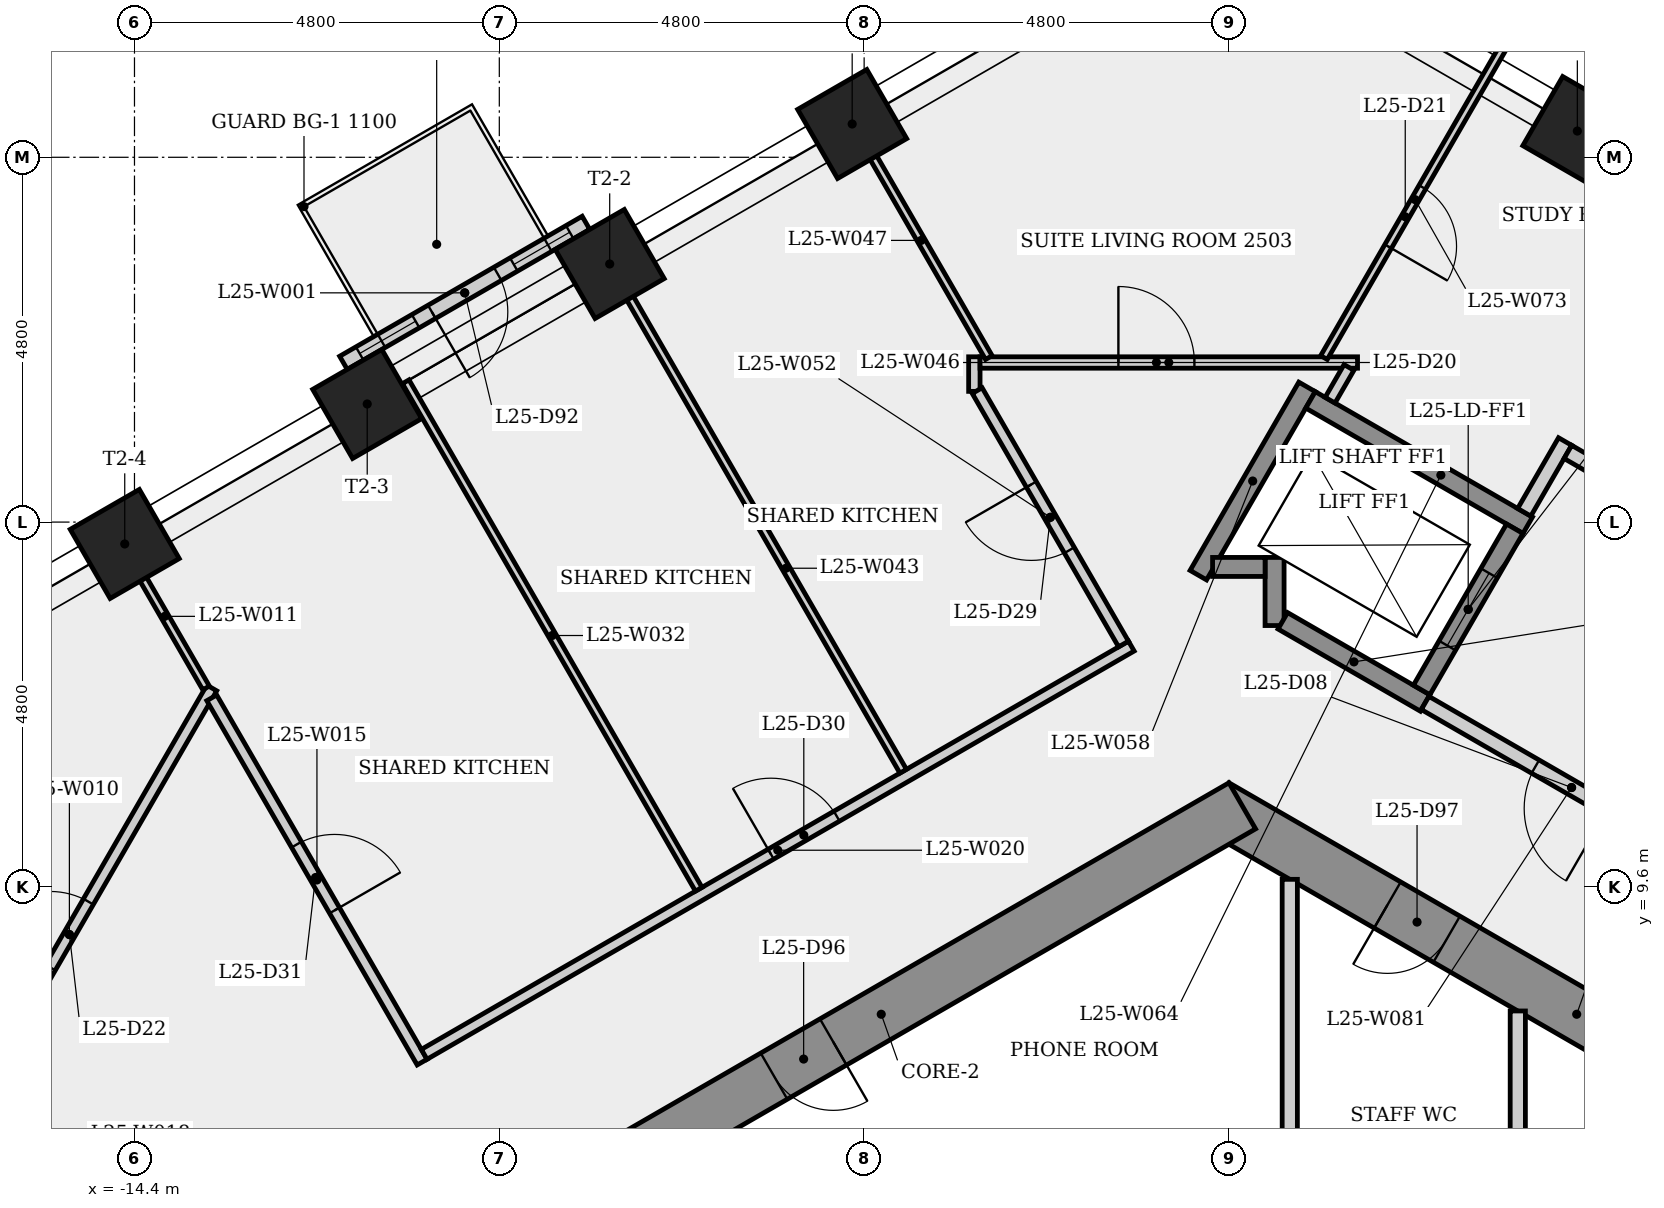
"""IFC4 building model, lengths in metres.
Left out: names, types, materials, properties, quantities, classifications, styles, units other than length and angle.
Written with IfcOpenShell. Run it as: python <this file> out.ifc"""

import sys

from ifc_helpers import new_model, si_unit, direction, frame, frame_2d, origin, origin_2d, place, context, subcontext, project, spatial, rectangle, extrude, element, fill, save


model = new_model("IFC4")
c1 = context("Model", 3, precision=1e-05, world=origin(), true_north=direction((0.0, 1.0)))
c2 = subcontext(c1, "Body", "Model", "MODEL_VIEW")
j1 = project(units=[si_unit("LENGTHUNIT", "METRE"), si_unit("PLANEANGLEUNIT", "RADIAN")], contexts=[c1])
p1 = place(None, origin())
s1 = spatial("IfcSite", under=j1, at=p1, CompositionType="ELEMENT")
p2 = place(p1, origin())
s2 = spatial("IfcBuilding", under=s1, at=p2, CompositionType="ELEMENT")
p3 = place(p2, frame((0.0, 0.0, 96.7)))
s3 = spatial("IfcBuildingStorey", under=s2, at=p3, CompositionType="ELEMENT", Elevation=96.7)
p4 = place(p3, frame((9.325, 5.182, 0.0), z_axis=(0.0, 0.0, 1.0), x_axis=(-0.866023993627, 0.500002442456, 0.0)))
e1 = element("IfcWall", 1, at=p4, inside=s3, PredefinedType="SHEAR", context=c2, shape_type="SweptSolid", body=[
    extrude(rectangle(XDim=10.97, YDim=0.7, at=frame_2d((5.485, 0.0))), origin(), (0.0, 0.0, 1.0), 3.4),
])
p5 = place(p4, frame((7.46, 0.0, 0.0)))
e2 = element("IfcOpeningElement", 2, at=p5, cuts=e1, PredefinedType="OPENING", context=c2, shape_type="SweptSolid", body=[
    extrude(rectangle(XDim=0.9, YDim=2.1, at=frame_2d((0.45, 1.05))), frame((0.0, 0.36, 0.0), z_axis=(0.0, -1.0, 0.0), x_axis=(1.0, 0.0, 0.0)), (0.0, 0.0, 1.0), 0.72),
])
p6 = place(p4, frame((1.201, 0.0, 0.0)))
e3 = element("IfcOpeningElement", 3, at=p6, cuts=e1, PredefinedType="OPENING", context=c2, shape_type="SweptSolid", body=[
    extrude(rectangle(XDim=0.9, YDim=2.1, at=frame_2d((0.45, 1.05))), frame((0.0, 0.36, 0.0), z_axis=(0.0, -1.0, 0.0), x_axis=(1.0, 0.0, 0.0)), (0.0, 0.0, 1.0), 0.72),
])
p7 = place(p3, frame((0.175, 10.667, 0.0), z_axis=(0.0, 0.0, 1.0), x_axis=(-0.866023993627, -0.500002442456, 0.0)))
e4 = element("IfcWall", 4, at=p7, inside=s3, PredefinedType="SHEAR", context=c2, shape_type="SweptSolid", body=[
    extrude(rectangle(XDim=10.97, YDim=0.7, at=frame_2d((5.485, 0.0))), origin(), (0.0, 0.0, 1.0), 3.4),
])
p8 = place(p7, frame((6.214, 0.0, 0.0)))
e5 = element("IfcOpeningElement", 5, at=p8, cuts=e4, PredefinedType="OPENING", context=c2, shape_type="SweptSolid", body=[
    extrude(rectangle(XDim=0.9, YDim=2.1, at=frame_2d((0.45, 1.05))), frame((0.0, 0.36, 0.0), z_axis=(0.0, -1.0, 0.0), x_axis=(1.0, 0.0, 0.0)), (0.0, 0.0, 1.0), 0.72),
])
for number, where, z_axis, x_axis in (
    (6, (4.583, 19.545, 0.0), (0.0, 0.0, 1.0), (0.5, 0.866, 0.0)),
    (7, (-4.957, 19.638, 0.0), (0.0, 0.0, 1.0), (-0.5, 0.866, 0.0)),
    (8, (-8.148, 17.796, 0.0), (0.0, 0.0, 1.0), (-0.5, 0.866, 0.0)),
    (9, (-11.338, 15.954, 0.0), (0.0, 0.0, 1.0), (-0.5, 0.866, 0.0)),
    (10, (-14.528, 14.112, 0.0), (0.0, 0.0, 1.0), (-0.5, 0.866, 0.0)),
):
    element("IfcColumn", number, at=place(p3, frame(where, z_axis=z_axis, x_axis=x_axis)), inside=s3, PredefinedType="COLUMN", context=c2, shape_type="SweptSolid", body=[
        extrude(rectangle(XDim=1.05, YDim=1.05, at=origin_2d()), origin(), (0.0, 0.0, 1.0), 3.4),
    ])
p9 = place(p3, frame((-8.46, 18.337, 0.0), z_axis=(0.0, 0.0, 1.0), x_axis=(-0.866020046725, -0.500009278584, 0.0)))
e11 = element("IfcWall", 11, at=p9, inside=s3, PredefinedType="SOLIDWALL", context=c2, shape_type="SweptSolid", body=[
    extrude(rectangle(XDim=3.684, YDim=0.2, at=frame_2d((1.842, 0.0))), origin(), (0.0, 0.0, 1.0), 3.4),
])
p10 = place(p9, frame((1.342, 0.0, 0.0)))
e12 = element("IfcOpeningElement", 12, at=p10, cuts=e11, PredefinedType="OPENING", context=c2, shape_type="SweptSolid", body=[
    extrude(rectangle(XDim=1.0, YDim=2.4, at=frame_2d((0.5, 1.2))), frame((0.0, 0.11, 0.0), z_axis=(0.0, -1.0, 0.0), x_axis=(1.0, 0.0, 0.0)), (0.0, 0.0, 1.0), 0.22),
])
p11 = place(p9, frame((0.246, 0.0, 0.9)))
e13 = element("IfcOpeningElement", 13, at=p11, cuts=e11, PredefinedType="OPENING", context=c2, shape_type="SweptSolid", body=[
    extrude(rectangle(XDim=0.85, YDim=1.5, at=frame_2d((0.425, 0.75))), frame((0.0, 0.11, 0.0), z_axis=(0.0, -1.0, 0.0), x_axis=(1.0, 0.0, 0.0)), (0.0, 0.0, 1.0), 0.22),
])
p12 = place(p9, frame((2.588, 0.0, 0.9)))
e14 = element("IfcOpeningElement", 14, at=p12, cuts=e11, PredefinedType="OPENING", context=c2, shape_type="SweptSolid", body=[
    extrude(rectangle(XDim=0.85, YDim=1.5, at=frame_2d((0.425, 0.75))), frame((0.0, 0.11, 0.0), z_axis=(0.0, -1.0, 0.0), x_axis=(1.0, 0.0, 0.0)), (0.0, 0.0, 1.0), 0.22),
])
p13 = place(p3, frame((-17.13, 5.728, 0.0), z_axis=(0.0, 0.0, 1.0), x_axis=(0.500011056795, 0.866019020047, 0.0)))
e15 = element("IfcWall", 15, at=p13, inside=s3, PredefinedType="PARTITIONING", context=c2, shape_type="SweptSolid", body=[
    extrude(rectangle(XDim=7.493, YDim=0.15, at=frame_2d((3.747, 0.0))), origin(), (0.0, 0.0, 1.0), 3.05),
])
p14 = place(p13, frame((3.247, 0.0, 0.0)))
e16 = element("IfcOpeningElement", 16, at=p14, cuts=e15, PredefinedType="OPENING", context=c2, shape_type="SweptSolid", body=[
    extrude(rectangle(XDim=1.0, YDim=2.1, at=frame_2d((0.5, 1.05))), frame((0.0, 0.085, 0.0), z_axis=(0.0, -1.0, 0.0), x_axis=(1.0, 0.0, 0.0)), (0.0, 0.0, 1.0), 0.17),
])
p15 = place(p3, frame((-14.546, 14.102, 0.0), z_axis=(0.0, 0.0, 1.0), x_axis=(0.500000893942, -0.866024887666, 0.0)))
e17 = element("IfcWall", 17, at=p15, inside=s3, PredefinedType="PARTITIONING", context=c2, shape_type="SweptSolid", body=[
    extrude(rectangle(XDim=2.176, YDim=0.1, at=frame_2d((1.088, 0.0))), origin(), (0.0, 0.0, 1.0), 3.05),
])
p16 = place(p3, frame((-13.383, 12.088, 0.0), z_axis=(0.0, 0.0, 1.0), x_axis=(0.499996101646, -0.866027654488, 0.0)))
e18 = element("IfcWall", 18, at=p16, inside=s3, PredefinedType="PARTITIONING", context=c2, shape_type="SweptSolid", body=[
    extrude(rectangle(XDim=5.535, YDim=0.15, at=frame_2d((2.767, 0.0))), origin(), (0.0, 0.0, 1.0), 3.05),
])
p17 = place(p16, frame((2.23, 0.0, 0.0)))
e19 = element("IfcOpeningElement", 19, at=p17, cuts=e18, PredefinedType="OPENING", context=c2, shape_type="SweptSolid", body=[
    extrude(rectangle(XDim=1.0, YDim=2.1, at=frame_2d((0.5, 1.05))), frame((0.0, 0.085, 0.0), z_axis=(0.0, -1.0, 0.0), x_axis=(1.0, 0.0, 0.0)), (0.0, 0.0, 1.0), 0.17),
])
p18 = place(p3, frame((-10.588, 7.397, 0.0), z_axis=(0.0, 0.0, 1.0), x_axis=(0.866026257053, 0.499998522093, 0.0)))
e20 = element("IfcWall", 20, at=p18, inside=s3, PredefinedType="PARTITIONING", context=c2, shape_type="SweptSolid", body=[
    extrude(rectangle(XDim=10.743, YDim=0.15, at=frame_2d((5.371, 0.0))), origin(), (0.0, 0.0, 1.0), 3.05),
])
p19 = place(p18, frame((5.267, 0.0, 0.0)))
e21 = element("IfcOpeningElement", 21, at=p19, cuts=e20, PredefinedType="OPENING", context=c2, shape_type="SweptSolid", body=[
    extrude(rectangle(XDim=1.0, YDim=2.1, at=frame_2d((0.5, 1.05))), frame((0.0, 0.085, 0.0), z_axis=(0.0, -1.0, 0.0), x_axis=(1.0, 0.0, 0.0)), (0.0, 0.0, 1.0), 0.17),
])
for number, where, z_axis, x_axis in (
    (22, (-6.976, 9.569, 0.0), (0.0, 0.0, 1.0), (-0.5, 0.866, 0.0)),
    (23, (-4.286, 11.122, 0.0), (0.0, 0.0, 1.0), (-0.5, 0.866, 0.0)),
):
    element("IfcWall", number, at=place(p3, frame(where, z_axis=z_axis, x_axis=x_axis)), inside=s3, PredefinedType="PARTITIONING", context=c2, shape_type="SweptSolid", body=[
        extrude(rectangle(XDim=7.71, YDim=0.1, at=frame_2d((3.855, 0.0))), origin(), (0.0, 0.0, 1.0), 3.05),
    ])
p20 = place(p3, frame((-3.35, 16.12, 0.0), z_axis=(0.0, 0.0, 1.0), x_axis=(0.0, 1.0, 0.0)))
e24 = element("IfcWall", 24, at=p20, inside=s3, PredefinedType="PARTITIONING", context=c2, shape_type="SweptSolid", body=[
    extrude(rectangle(XDim=0.455, YDim=0.15, at=frame_2d((0.227, 0.0))), origin(), (0.0, 0.0, 1.0), 3.05),
])
p21 = place(p3, frame((-3.275, 16.5, 0.0), z_axis=(0.0, 0.0, 1.0), x_axis=(1.0, 0.0, 0.0)))
e25 = element("IfcWall", 25, at=p21, inside=s3, PredefinedType="PARTITIONING", context=c2, shape_type="SweptSolid", body=[
    extrude(rectangle(XDim=4.966, YDim=0.15, at=frame_2d((2.483, 0.0))), origin(), (0.0, 0.0, 1.0), 3.05),
])
p22 = place(p21, frame((1.82, 0.0, 0.0)))
e26 = element("IfcOpeningElement", 26, at=p22, cuts=e25, PredefinedType="OPENING", context=c2, shape_type="SweptSolid", body=[
    extrude(rectangle(XDim=1.0, YDim=2.1, at=frame_2d((0.5, 1.05))), frame((0.0, 0.085, 0.0), z_axis=(0.0, -1.0, 0.0), x_axis=(1.0, 0.0, 0.0)), (0.0, 0.0, 1.0), 0.17),
])
p23 = place(p3, frame((-3.159, 16.565, 0.0), z_axis=(0.0, 0.0, 1.0), x_axis=(-0.499951970318, 0.866053131959, 0.0)))
e27 = element("IfcWall", 27, at=p23, inside=s3, PredefinedType="PARTITIONING", context=c2, shape_type="SweptSolid", body=[
    extrude(rectangle(XDim=3.56, YDim=0.1, at=frame_2d((1.78, 0.0))), origin(), (0.0, 0.0, 1.0), 3.05),
])
p24 = place(p3, frame((-1.387, 12.796, 0.0), z_axis=(0.0, 0.0, 1.0), x_axis=(-0.500006057782, 0.866021906294, 0.0)))
e28 = element("IfcWall", 28, at=p24, inside=s3, PredefinedType="PARTITIONING", context=c2, shape_type="SweptSolid", body=[
    extrude(rectangle(XDim=3.85, YDim=0.15, at=frame_2d((1.925, 0.0))), origin(), (0.0, 0.0, 1.0), 3.05),
])
p25 = place(p24, frame((1.425, 0.0, 0.0)))
e29 = element("IfcOpeningElement", 29, at=p25, cuts=e28, PredefinedType="OPENING", context=c2, shape_type="SweptSolid", body=[
    extrude(rectangle(XDim=1.0, YDim=2.1, at=frame_2d((0.5, 1.05))), frame((0.0, 0.085, 0.0), z_axis=(0.0, -1.0, 0.0), x_axis=(1.0, 0.0, 0.0)), (0.0, 0.0, 1.0), 0.17),
])
p26 = place(p3, frame((-0.403, 13.702, 0.0), z_axis=(0.0, 0.0, 1.0), x_axis=(0.499976111731, 0.866039195244, 0.0)))
e30 = element("IfcWall", 30, at=p26, inside=s3, PredefinedType="SHEAR", context=c2, shape_type="SweptSolid", body=[
    extrude(rectangle(XDim=2.861, YDim=0.25, at=frame_2d((1.43, 0.0))), origin(), (0.0, 0.0, 1.0), 3.05),
])
p27 = place(p3, frame((0.6, 13.039, 0.0), z_axis=(0.0, 0.0, 1.0), x_axis=(0.0, 1.0, 0.0)))
e31 = element("IfcWall", 31, at=p27, inside=s3, PredefinedType="SHEAR", context=c2, shape_type="SweptSolid", body=[
    extrude(rectangle(XDim=0.896, YDim=0.25, at=frame_2d((0.448, 0.0))), origin(), (0.0, 0.0, 1.0), 3.05),
])
p28 = place(p3, frame((0.475, 13.81, 0.0), z_axis=(0.0, 0.0, 1.0), x_axis=(-1.0, 0.0, 0.0)))
e32 = element("IfcWall", 32, at=p28, inside=s3, PredefinedType="SHEAR", context=c2, shape_type="SweptSolid", body=[
    extrude(rectangle(XDim=0.691, YDim=0.25, at=frame_2d((0.345, 0.0))), origin(), (0.0, 0.0, 1.0), 3.4),
])
p29 = place(p3, frame((0.8, 9.699, 0.0), z_axis=(0.0, 0.0, 1.0), x_axis=(0.0, -1.0, 0.0)))
e33 = element("IfcWall", 33, at=p29, inside=s3, PredefinedType="PARTITIONING", context=c2, shape_type="SweptSolid", body=[
    extrude(rectangle(XDim=4.425, YDim=0.2, at=frame_2d((2.212, 0.0))), origin(), (0.0, 0.0, 1.0), 3.05),
])
p30 = place(p3, frame((1.073, 16.008, 0.0), z_axis=(0.0, 0.0, 1.0), x_axis=(0.866040211805, -0.499974350878, 0.0)))
e34 = element("IfcWall", 34, at=p30, inside=s3, PredefinedType="SHEAR", context=c2, shape_type="SweptSolid", body=[
    extrude(rectangle(XDim=3.3, YDim=0.25, at=frame_2d((1.65, 0.0))), origin(), (0.0, 0.0, 1.0), 3.05),
])
p31 = place(p3, frame((1.579, 16.435, 0.0), z_axis=(0.0, 0.0, 1.0), x_axis=(-0.500359323436, -0.865817848887, 0.0)))
e35 = element("IfcWall", 35, at=p31, inside=s3, PredefinedType="PARTITIONING", context=c2, shape_type="SweptSolid", body=[
    extrude(rectangle(XDim=0.498, YDim=0.15, at=frame_2d((0.249, 0.0))), origin(), (0.0, 0.0, 1.0), 3.05),
])
p32 = place(p3, frame((2.581, 12.02, 0.0), z_axis=(0.0, 0.0, 1.0), x_axis=(-0.86603892542, 0.499976579108, 0.0)))
e36 = element("IfcWall", 36, at=p32, inside=s3, PredefinedType="SHEAR", context=c2, shape_type="SweptSolid", body=[
    extrude(rectangle(XDim=2.162, YDim=0.25, at=frame_2d((1.081, 0.0))), origin(), (0.0, 0.0, 1.0), 3.05),
])
p33 = place(p3, frame((2.535, 12.191, 0.0), z_axis=(0.0, 0.0, 1.0), x_axis=(0.500061746146, 0.865989751695, 0.0)))
e37 = element("IfcWall", 37, at=p33, inside=s3, PredefinedType="SHEAR", context=c2, shape_type="SweptSolid", body=[
    extrude(rectangle(XDim=2.45, YDim=0.25, at=frame_2d((1.225, 0.0))), origin(), (0.0, 0.0, 1.0), 3.4),
])
p34 = place(p33, frame((0.675, 0.0, 0.0)))
e38 = element("IfcOpeningElement", 38, at=p34, cuts=e37, PredefinedType="OPENING", context=c2, shape_type="SweptSolid", body=[
    extrude(rectangle(XDim=1.1, YDim=2.1, at=frame_2d((0.55, 1.05))), frame((0.0, 0.135, 0.0), z_axis=(0.0, -1.0, 0.0), x_axis=(1.0, 0.0, 0.0)), (0.0, 0.0, 1.0), 0.27),
])
p35 = place(p3, frame((3.649, 20.721, 0.0), z_axis=(0.0, 0.0, 1.0), x_axis=(-0.499991085587, -0.866030550462, 0.0)))
e39 = element("IfcWall", 39, at=p35, inside=s3, PredefinedType="PARTITIONING", context=c2, shape_type="SweptSolid", body=[
    extrude(rectangle(XDim=4.799, YDim=0.1, at=frame_2d((2.399, 0.0))), origin(), (0.0, 0.0, 1.0), 3.05),
])
p36 = place(p35, frame((2.21, 0.0, 0.0)))
e40 = element("IfcOpeningElement", 40, at=p36, cuts=e39, PredefinedType="OPENING", context=c2, shape_type="SweptSolid", body=[
    extrude(rectangle(XDim=0.9, YDim=2.1, at=frame_2d((0.45, 1.05))), frame((0.0, 0.06, 0.0), z_axis=(0.0, -1.0, 0.0), x_axis=(1.0, 0.0, 0.0)), (0.0, 0.0, 1.0), 0.12),
])
p37 = place(p3, frame((3.8, 7.967, 0.0), z_axis=(0.0, 0.0, 1.0), x_axis=(0.0, -1.0, 0.0)))
e41 = element("IfcWall", 41, at=p37, inside=s3, PredefinedType="PARTITIONING", context=c2, shape_type="SweptSolid", body=[
    extrude(rectangle(XDim=2.692, YDim=0.2, at=frame_2d((1.346, 0.0))), origin(), (0.0, 0.0, 1.0), 3.05),
])
p38 = place(p3, frame((3.885, 14.529, 0.0), z_axis=(0.0, 0.0, 1.0), x_axis=(0.499997628298, 0.866026773083, 0.0)))
e42 = element("IfcWall", 42, at=p38, inside=s3, PredefinedType="PARTITIONING", context=c2, shape_type="SweptSolid", body=[
    extrude(rectangle(XDim=1.075, YDim=0.2, at=frame_2d((0.538, 0.0))), origin(), (0.0, 0.0, 1.0), 3.05),
])
p39 = place(p3, frame((4.459, 15.323, 0.0), z_axis=(0.0, 0.0, 1.0), x_axis=(0.866016039709, -0.500016218704, 0.0)))
e43 = element("IfcWall", 43, at=p39, inside=s3, PredefinedType="PARTITIONING", context=c2, shape_type="SweptSolid", body=[
    extrude(rectangle(XDim=4.7, YDim=0.2, at=frame_2d((2.35, 0.0))), origin(), (0.0, 0.0, 1.0), 3.05),
])
p40 = place(p3, frame((6.435, 9.795, 0.0), z_axis=(0.0, 0.0, 1.0), x_axis=(-0.866012907634, 0.500021643343, 0.0)))
e44 = element("IfcWall", 44, at=p40, inside=s3, PredefinedType="PARTITIONING", context=c2, shape_type="SweptSolid", body=[
    extrude(rectangle(XDim=4.45, YDim=0.2, at=frame_2d((2.225, 0.0))), origin(), (0.0, 0.0, 1.0), 3.05),
])
p41 = place(p40, frame((1.675, 0.0, 0.0)))
e45 = element("IfcOpeningElement", 45, at=p41, cuts=e44, PredefinedType="OPENING", context=c2, shape_type="SweptSolid", body=[
    extrude(rectangle(XDim=1.1, YDim=2.1, at=frame_2d((0.55, 1.05))), frame((0.0, 0.11, 0.0), z_axis=(0.0, -1.0, 0.0), x_axis=(1.0, 0.0, 0.0)), (0.0, 0.0, 1.0), 0.22),
])
p42 = place(p10, origin())
e46 = element("IfcDoor", 46, at=p42, inside=s3, OperationType="SINGLE_SWING_RIGHT", PredefinedType="DOOR", context=c2, shape_type="SweptSolid", body=[
    extrude(rectangle(XDim=1.0, YDim=2.4, at=frame_2d((0.5, 1.2))), frame((0.0, 0.025, 0.0), z_axis=(0.0, -1.0, 0.0), x_axis=(1.0, 0.0, 0.0)), (0.0, 0.0, 1.0), 0.05),
])
fill(e12, e46)
p43 = place(p11, origin())
e47 = element("IfcWindow", 47, at=p43, inside=s3, PartitioningType="SINGLE_PANEL", PredefinedType="WINDOW", context=c2, shape_type="SweptSolid", body=[
    extrude(rectangle(XDim=0.85, YDim=1.5, at=frame_2d((0.425, 0.75))), frame((0.0, 0.03, 0.0), z_axis=(0.0, -1.0, 0.0), x_axis=(1.0, 0.0, 0.0)), (0.0, 0.0, 1.0), 0.06),
])
fill(e13, e47)
p44 = place(p12, origin())
e48 = element("IfcWindow", 48, at=p44, inside=s3, PartitioningType="SINGLE_PANEL", PredefinedType="WINDOW", context=c2, shape_type="SweptSolid", body=[
    extrude(rectangle(XDim=0.85, YDim=1.5, at=frame_2d((0.425, 0.75))), frame((0.0, 0.03, 0.0), z_axis=(0.0, -1.0, 0.0), x_axis=(1.0, 0.0, 0.0)), (0.0, 0.0, 1.0), 0.06),
])
fill(e14, e48)
p45 = place(p41, origin())
e49 = element("IfcDoor", 49, at=p45, inside=s3, OperationType="SINGLE_SWING_LEFT", PredefinedType="DOOR", context=c2, shape_type="SweptSolid", body=[
    extrude(rectangle(XDim=1.1, YDim=2.1, at=frame_2d((0.55, 1.05))), frame((0.0, 0.025, 0.0), z_axis=(0.0, -1.0, 0.0), x_axis=(1.0, 0.0, 0.0)), (0.0, 0.0, 1.0), 0.05),
])
fill(e45, e49)
p46 = place(p34, origin())
e50 = element("IfcDoor", 50, at=p46, inside=s3, OperationType="SLIDING_TO_LEFT", PredefinedType="DOOR", context=c2, shape_type="SweptSolid", body=[
    extrude(rectangle(XDim=1.1, YDim=2.1, at=frame_2d((0.55, 1.05))), frame((0.0, 0.025, 0.0), z_axis=(0.0, -1.0, 0.0), x_axis=(1.0, 0.0, 0.0)), (0.0, 0.0, 1.0), 0.05),
])
fill(e38, e50)
p47 = place(p22, origin())
e51 = element("IfcDoor", 51, at=p47, inside=s3, OperationType="SINGLE_SWING_LEFT", PredefinedType="DOOR", context=c2, shape_type="SweptSolid", body=[
    extrude(rectangle(XDim=1.0, YDim=2.1, at=frame_2d((0.5, 1.05))), frame((0.0, 0.025, 0.0), z_axis=(0.0, -1.0, 0.0), x_axis=(1.0, 0.0, 0.0)), (0.0, 0.0, 1.0), 0.05),
])
fill(e26, e51)
p48 = place(p36, origin())
e52 = element("IfcDoor", 52, at=p48, inside=s3, OperationType="SINGLE_SWING_RIGHT", PredefinedType="DOOR", context=c2, shape_type="SweptSolid", body=[
    extrude(rectangle(XDim=0.9, YDim=2.1, at=frame_2d((0.45, 1.05))), frame((0.0, 0.025, 0.0), z_axis=(0.0, -1.0, 0.0), x_axis=(1.0, 0.0, 0.0)), (0.0, 0.0, 1.0), 0.05),
])
fill(e40, e52)
p49 = place(p14, origin())
e53 = element("IfcDoor", 53, at=p49, inside=s3, OperationType="SINGLE_SWING_LEFT", PredefinedType="DOOR", context=c2, shape_type="SweptSolid", body=[
    extrude(rectangle(XDim=1.0, YDim=2.1, at=frame_2d((0.5, 1.05))), frame((0.0, 0.025, 0.0), z_axis=(0.0, -1.0, 0.0), x_axis=(1.0, 0.0, 0.0)), (0.0, 0.0, 1.0), 0.05),
])
fill(e16, e53)
p50 = place(p25, origin())
e54 = element("IfcDoor", 54, at=p50, inside=s3, OperationType="SINGLE_SWING_RIGHT", PredefinedType="DOOR", context=c2, shape_type="SweptSolid", body=[
    extrude(rectangle(XDim=1.0, YDim=2.1, at=frame_2d((0.5, 1.05))), frame((0.0, 0.025, 0.0), z_axis=(0.0, -1.0, 0.0), x_axis=(1.0, 0.0, 0.0)), (0.0, 0.0, 1.0), 0.05),
])
fill(e29, e54)
p51 = place(p19, origin())
e55 = element("IfcDoor", 55, at=p51, inside=s3, OperationType="SINGLE_SWING_LEFT", PredefinedType="DOOR", context=c2, shape_type="SweptSolid", body=[
    extrude(rectangle(XDim=1.0, YDim=2.1, at=frame_2d((0.5, 1.05))), frame((0.0, 0.025, 0.0), z_axis=(0.0, -1.0, 0.0), x_axis=(1.0, 0.0, 0.0)), (0.0, 0.0, 1.0), 0.05),
])
fill(e21, e55)
p52 = place(p17, origin())
e56 = element("IfcDoor", 56, at=p52, inside=s3, OperationType="SINGLE_SWING_RIGHT", PredefinedType="DOOR", context=c2, shape_type="SweptSolid", body=[
    extrude(rectangle(XDim=1.0, YDim=2.1, at=frame_2d((0.5, 1.05))), frame((0.0, 0.025, 0.0), z_axis=(0.0, -1.0, 0.0), x_axis=(1.0, 0.0, 0.0)), (0.0, 0.0, 1.0), 0.05),
])
fill(e19, e56)
p53 = place(p8, origin())
e57 = element("IfcDoor", 57, at=p53, inside=s3, OperationType="SINGLE_SWING_LEFT", PredefinedType="DOOR", context=c2, shape_type="SweptSolid", body=[
    extrude(rectangle(XDim=0.9, YDim=2.1, at=frame_2d((0.45, 1.05))), frame((0.0, 0.025, 0.0), z_axis=(0.0, -1.0, 0.0), x_axis=(1.0, 0.0, 0.0)), (0.0, 0.0, 1.0), 0.05),
])
fill(e5, e57)
p54 = place(p5, origin())
e58 = element("IfcDoor", 58, at=p54, inside=s3, OperationType="SINGLE_SWING_RIGHT", PredefinedType="DOOR", context=c2, shape_type="SweptSolid", body=[
    extrude(rectangle(XDim=0.9, YDim=2.1, at=frame_2d((0.45, 1.05))), frame((0.0, 0.025, 0.0), z_axis=(0.0, -1.0, 0.0), x_axis=(1.0, 0.0, 0.0)), (0.0, 0.0, 1.0), 0.05),
])
fill(e2, e58)
save(model, sys.argv[1])
